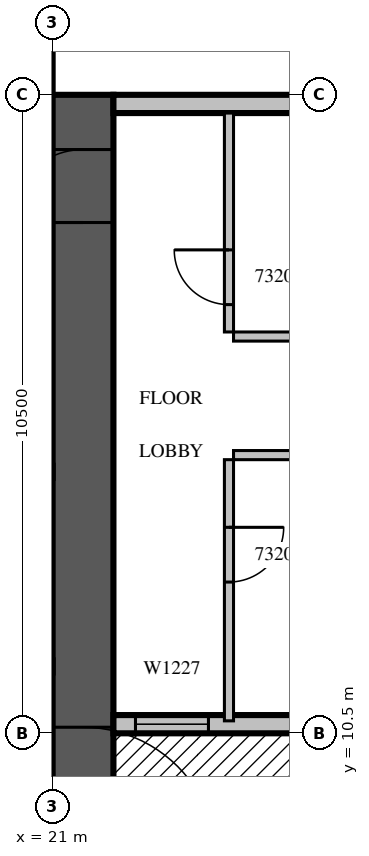
"""IFC4 building model, lengths in metres.
Left out: names, types, materials, properties, quantities, classifications, styles, units other than length and angle.
Written with IfcOpenShell. Run it as: python <this file> out.ifc"""

import sys

from ifc_helpers import new_model, si_unit, direction, frame, frame_2d, origin, place, context, subcontext, project, spatial, rectangle, extrude, source, transform, mapped, element, fill, save


model = new_model("IFC4")
c1 = context("Model", 3, precision=1e-05, world=origin(), true_north=direction((0.0, 1.0)))
c2 = subcontext(c1, "Body", "Model", "MODEL_VIEW")
j1 = project(units=[si_unit("LENGTHUNIT", "METRE"), si_unit("PLANEANGLEUNIT", "RADIAN")], contexts=[c1])
p1 = place(None, origin())
s1 = spatial("IfcSite", under=j1, at=p1, CompositionType="ELEMENT")
p2 = place(p1, origin())
s2 = spatial("IfcBuilding", under=s1, at=p2, CompositionType="ELEMENT")
p3 = place(p2, frame((0.0, 0.0, 145.5)))
s3 = spatial("IfcBuildingStorey", under=s2, at=p3, CompositionType="ELEMENT", Elevation=145.5)
m1 = source(origin(), c2, "Body", "SweptSolid", [
    extrude(rectangle(XDim=16.8, YDim=1.0, at=frame_2d((8.4, 0.0))), origin(), (0.0, 0.0, 1.0), 4.2),
])
p4 = place(p3, frame((21.5, 4.2, 0.0), z_axis=(0.0, 0.0, 1.0), x_axis=(0.0, 1.0, 0.0)))
e1 = element("IfcWall", 1, at=p4, inside=s3, PredefinedType="SHEAR", context=c2, shape_type="MappedRepresentation", body=[
    mapped(m1, transform((0.0, 0.0, 0.0), scale=1.0)),
])
m2 = source(origin(), c2, "Body", "SweptSolid", [
    extrude(rectangle(XDim=2.2, YDim=2.1, at=frame_2d((1.1, 1.05))), frame((0.0, 0.51, 0.0), z_axis=(0.0, -1.0, 0.0), x_axis=(1.0, 0.0, 0.0)), (0.0, 0.0, 1.0), 1.02),
])
p5 = place(p4, frame((4.2, 0.0, 0.0)))
e2 = element("IfcOpeningElement", 2, at=p5, cuts=e1, PredefinedType="OPENING", context=c2, shape_type="MappedRepresentation", body=[
    mapped(m2, transform((0.0, 0.0, 0.0), scale=1.0)),
])
m3 = source(origin(), c2, "Body", "SweptSolid", [
    extrude(rectangle(XDim=1.2, YDim=2.1, at=frame_2d((0.6, 1.05))), frame((0.0, 0.51, 0.0), z_axis=(0.0, -1.0, 0.0), x_axis=(1.0, 0.0, 0.0)), (0.0, 0.0, 1.0), 1.02),
])
p6 = place(p4, frame((14.7, 0.0, 0.0)))
e3 = element("IfcOpeningElement", 3, at=p6, cuts=e1, PredefinedType="OPENING", context=c2, shape_type="MappedRepresentation", body=[
    mapped(m3, transform((0.0, 0.0, 0.0), scale=1.0)),
])
m4 = source(origin(), c2, "Body", "SweptSolid", [
    extrude(rectangle(XDim=6.875, YDim=0.3, at=frame_2d((3.438, 0.0))), origin(), (0.0, 0.0, 1.0), 3.8),
])
p7 = place(p3, frame((22.0, 10.65, 0.0), z_axis=(0.0, 0.0, 1.0), x_axis=(1.0, 0.0, 0.0)))
e4 = element("IfcWall", 4, at=p7, inside=s3, PredefinedType="STANDARD", context=c2, shape_type="MappedRepresentation", body=[
    mapped(m4, transform((0.0, 0.0, 0.0), scale=1.0)),
])
m5 = source(origin(), c2, "Body", "SweptSolid", [
    extrude(rectangle(XDim=1.2, YDim=2.7, at=frame_2d((0.6, 1.35))), frame((0.0, 0.16, 0.0), z_axis=(0.0, -1.0, 0.0), x_axis=(1.0, 0.0, 0.0)), (0.0, 0.0, 1.0), 0.32),
])
p8 = place(p7, frame((0.362, 0.0, 0.6)))
e5 = element("IfcOpeningElement", 5, at=p8, cuts=e4, PredefinedType="OPENING", context=c2, shape_type="MappedRepresentation", body=[
    mapped(m5, transform((0.0, 0.0, 0.0), scale=1.0)),
])
m6 = source(origin(), c2, "Body", "SweptSolid", [
    extrude(rectangle(XDim=1.8, YDim=2.4, at=frame_2d((0.9, 1.2))), frame((0.0, 0.16, 0.0), z_axis=(0.0, -1.0, 0.0), x_axis=(1.0, 0.0, 0.0)), (0.0, 0.0, 1.0), 0.32),
])
p9 = place(p7, frame((4.4, 0.0, 0.0)))
e6 = element("IfcOpeningElement", 6, at=p9, cuts=e4, PredefinedType="OPENING", context=c2, shape_type="MappedRepresentation", body=[
    mapped(m6, transform((0.0, 0.0, 0.0), scale=1.0)),
])
p10 = place(p3, frame((28.875, 20.85, 0.0), z_axis=(0.0, 0.0, 1.0), x_axis=(-1.0, 0.0, 0.0)))
e7 = element("IfcWall", 7, at=p10, inside=s3, PredefinedType="STANDARD", context=c2, shape_type="MappedRepresentation", body=[
    mapped(m4, transform((0.0, 0.0, 0.0), scale=1.0)),
])
m7 = source(origin(), c2, "Body", "SweptSolid", [
    extrude(rectangle(XDim=2.4, YDim=2.7, at=frame_2d((1.2, 1.35))), frame((0.0, 0.16, 0.0), z_axis=(0.0, -1.0, 0.0), x_axis=(1.0, 0.0, 0.0)), (0.0, 0.0, 1.0), 0.32),
])
p11 = place(p10, frame((0.375, 0.0, 0.6)))
e8 = element("IfcOpeningElement", 8, at=p11, cuts=e7, PredefinedType="OPENING", context=c2, shape_type="MappedRepresentation", body=[
    mapped(m7, transform((0.0, 0.0, 0.0), scale=1.0)),
])
m8 = source(origin(), c2, "Body", "SweptSolid", [
    extrude(rectangle(XDim=4.295, YDim=0.15, at=frame_2d((2.147, 0.0))), origin(), (0.0, 0.0, 1.0), 3.8),
])
p12 = place(p3, frame((23.9, 15.0, 0.0), z_axis=(0.0, 0.0, 1.0), x_axis=(0.0, -1.0, 0.0)))
e9 = element("IfcWall", 9, at=p12, inside=s3, PredefinedType="PARTITIONING", context=c2, shape_type="MappedRepresentation", body=[
    mapped(m8, transform((0.0, 0.0, 0.0), scale=1.0)),
])
m9 = source(origin(), c2, "Body", "SweptSolid", [
    extrude(rectangle(XDim=0.9, YDim=2.1, at=frame_2d((0.45, 1.05))), frame((0.0, 0.085, 0.0), z_axis=(0.0, -1.0, 0.0), x_axis=(1.0, 0.0, 0.0)), (0.0, 0.0, 1.0), 0.17),
])
p13 = place(p12, frame((1.113, 0.0, 0.0)))
e10 = element("IfcOpeningElement", 10, at=p13, cuts=e9, PredefinedType="OPENING", context=c2, shape_type="MappedRepresentation", body=[
    mapped(m9, transform((0.0, 0.0, 0.0), scale=1.0)),
])
m10 = source(origin(), c2, "Body", "SweptSolid", [
    extrude(rectangle(XDim=3.6, YDim=0.15, at=frame_2d((1.8, 0.0))), origin(), (0.0, 0.0, 1.0), 3.8),
])
p14 = place(p3, frame((23.9, 20.7, 0.0), z_axis=(0.0, 0.0, 1.0), x_axis=(0.0, -1.0, 0.0)))
e11 = element("IfcWall", 11, at=p14, inside=s3, PredefinedType="PARTITIONING", context=c2, shape_type="MappedRepresentation", body=[
    mapped(m10, transform((0.0, 0.0, 0.0), scale=1.0)),
])
p15 = place(p14, frame((2.25, 0.0, 0.0)))
e12 = element("IfcOpeningElement", 12, at=p15, cuts=e11, PredefinedType="OPENING", context=c2, shape_type="MappedRepresentation", body=[
    mapped(m9, transform((0.0, 0.0, 0.0), scale=1.0)),
])
m11 = source(origin(), c2, "Body", "SweptSolid", [
    extrude(rectangle(XDim=5.35, YDim=0.15, at=frame_2d((2.675, 0.0))), origin(), (0.0, 0.0, 1.0), 3.8),
])
for number, where, z_axis, x_axis in (
    (13, (29.325, 15.075, 0.0), (0.0, 0.0, 1.0), (-1.0, 0.0, 0.0)),
    (14, (23.975, 17.025, 0.0), (0.0, 0.0, 1.0), (1.0, 0.0, 0.0)),
):
    element("IfcWall", number, at=place(p3, frame(where, z_axis=z_axis, x_axis=x_axis)), inside=s3, PredefinedType="PARTITIONING", context=c2, shape_type="MappedRepresentation", body=[
        mapped(m11, transform((0.0, 0.0, 0.0), scale=1.0)),
    ])
m12 = source(origin(), c2, "Body", "SweptSolid", [
    extrude(rectangle(XDim=1.2, YDim=2.7, at=frame_2d((0.6, 1.35))), frame((0.0, 0.03, 0.0), z_axis=(0.0, -1.0, 0.0), x_axis=(1.0, 0.0, 0.0)), (0.0, 0.0, 1.0), 0.06),
])
p16 = place(p8, origin())
e15 = element("IfcWindow", 15, at=p16, inside=s3, PartitioningType="SINGLE_PANEL", PredefinedType="WINDOW", context=c2, shape_type="MappedRepresentation", body=[
    mapped(m12, transform((0.0, 0.0, 0.0), scale=1.0)),
])
fill(e5, e15)
m13 = source(origin(), c2, "Body", "SweptSolid", [
    extrude(rectangle(XDim=2.2, YDim=2.1, at=frame_2d((1.1, 1.05))), frame((0.0, 0.025, 0.0), z_axis=(0.0, -1.0, 0.0), x_axis=(1.0, 0.0, 0.0)), (0.0, 0.0, 1.0), 0.05),
])
p17 = place(p5, origin())
e16 = element("IfcDoor", 16, at=p17, inside=s3, OperationType="DOUBLE_DOOR_SINGLE_SWING", PredefinedType="DOOR", context=c2, shape_type="MappedRepresentation", body=[
    mapped(m13, transform((0.0, 0.0, 0.0), scale=1.0)),
])
fill(e2, e16)
m14 = source(origin(), c2, "Body", "SweptSolid", [
    extrude(rectangle(XDim=1.2, YDim=2.1, at=frame_2d((0.6, 1.05))), frame((0.0, 0.025, 0.0), z_axis=(0.0, -1.0, 0.0), x_axis=(1.0, 0.0, 0.0)), (0.0, 0.0, 1.0), 0.05),
])
p18 = place(p6, origin())
e17 = element("IfcDoor", 17, at=p18, inside=s3, OperationType="SINGLE_SWING_LEFT", PredefinedType="DOOR", context=c2, shape_type="MappedRepresentation", body=[
    mapped(m14, transform((0.0, 0.0, 0.0), scale=1.0)),
])
fill(e3, e17)
m15 = source(origin(), c2, "Body", "SweptSolid", [
    extrude(rectangle(XDim=0.9, YDim=2.1, at=frame_2d((0.45, 1.05))), frame((0.0, 0.025, 0.0), z_axis=(0.0, -1.0, 0.0), x_axis=(1.0, 0.0, 0.0)), (0.0, 0.0, 1.0), 0.05),
])
p19 = place(p13, origin())
e18 = element("IfcDoor", 18, at=p19, inside=s3, OperationType="SINGLE_SWING_LEFT", PredefinedType="DOOR", context=c2, shape_type="MappedRepresentation", body=[
    mapped(m15, transform((0.0, 0.0, 0.0), scale=1.0)),
])
fill(e10, e18)
p20 = place(p15, origin())
e19 = element("IfcDoor", 19, at=p20, inside=s3, OperationType="SINGLE_SWING_RIGHT", PredefinedType="DOOR", context=c2, shape_type="MappedRepresentation", body=[
    mapped(m15, transform((0.0, 0.0, 0.0), scale=1.0)),
])
fill(e12, e19)
save(model, sys.argv[1])
